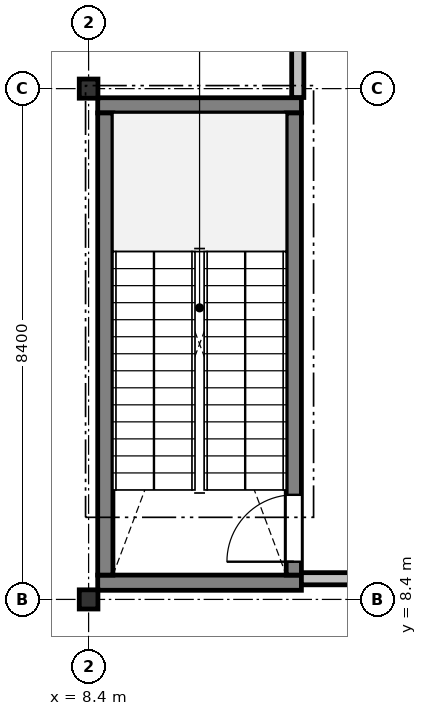
"""IFC4 building model, lengths in metres.
Left out: names, types, materials, properties, quantities, classifications, styles, units other than length and angle.
Written with IfcOpenShell. Run it as: python <this file> out.ifc"""

import sys

from ifc_helpers import new_model, si_unit, direction, frame, frame_2d, origin, origin_2d, place, context, subcontext, project, spatial, rectangle, i_section, extrude, element, fill, save


model = new_model("IFC4")
c1 = context("Model", 3, precision=1e-05, world=origin(), true_north=direction((0.0, 1.0)))
c2 = subcontext(c1, "Body", "Model", "MODEL_VIEW")
j1 = project(units=[si_unit("LENGTHUNIT", "METRE"), si_unit("PLANEANGLEUNIT", "RADIAN")], contexts=[c1])
p1 = place(None, origin())
s1 = spatial("IfcSite", under=j1, at=p1, CompositionType="ELEMENT")
p2 = place(p1, origin())
s2 = spatial("IfcBuilding", under=s1, at=p2, CompositionType="ELEMENT")
p3 = place(p2, frame((0.0, 0.0, 333.0)))
s3 = spatial("IfcBuildingStorey", under=s2, at=p3, CompositionType="ELEMENT", Elevation=333.0)
for number, where, z_axis, x_axis in (
    (1, (8.4, 8.4, 0.0), (0.0, 0.0, 1.0), (1.0, 0.0, 0.0)),
    (2, (8.4, 16.8, 0.0), (0.0, 0.0, 1.0), (1.0, 0.0, 0.0)),
):
    element("IfcColumn", number, at=place(p3, frame(where, z_axis=z_axis, x_axis=x_axis)), inside=s3, PredefinedType="COLUMN", context=c2, shape_type="SweptSolid", body=[
        extrude(i_section(OverallWidth=0.307, OverallDepth=0.315, WebThickness=0.012, FlangeThickness=0.019, FilletRadius=0.017, at=origin_2d()), origin(), (0.0, 0.0, 1.0), 5.05),
    ])
for number, where, z_axis, x_axis in (
    (3, (11.9, 8.675, -0.275), (0.0, 0.0, 1.0), (-1.0, 0.0, 0.0)),
    (4, (11.9, 16.525, -0.275), (0.0, 0.0, 1.0), (-1.0, 0.0, 0.0)),
):
    element("IfcWall", number, at=place(p3, frame(where, z_axis=z_axis, x_axis=x_axis)), inside=s3, PredefinedType="SHEAR", context=c2, shape_type="SweptSolid", body=[
        extrude(rectangle(XDim=3.35, YDim=0.25, at=frame_2d((1.675, 0.0))), origin(), (0.0, 0.0, 1.0), 5.325),
    ])
p4 = place(p3, frame((11.775, 8.8, -0.275), z_axis=(0.0, 0.0, 1.0), x_axis=(0.0, 1.0, 0.0)))
e5 = element("IfcWall", 5, at=p4, inside=s3, PredefinedType="SHEAR", context=c2, shape_type="SweptSolid", body=[
    extrude(rectangle(XDim=7.6, YDim=0.25, at=frame_2d((3.8, 0.0))), origin(), (0.0, 0.0, 1.0), 5.325),
])
p5 = place(p4, frame((0.22, 0.0, 0.275)))
e6 = element("IfcOpeningElement", 6, at=p5, cuts=e5, PredefinedType="OPENING", context=c2, shape_type="SweptSolid", body=[
    extrude(rectangle(XDim=1.1, YDim=2.15, at=frame_2d((0.55, 1.075))), frame((0.0, 0.135, 0.0), z_axis=(0.0, -1.0, 0.0), x_axis=(1.0, 0.0, 0.0)), (0.0, 0.0, 1.0), 0.27),
])
p6 = place(p3, frame((8.675, 8.8, -0.275), z_axis=(0.0, 0.0, 1.0), x_axis=(0.0, 1.0, 0.0)))
e7 = element("IfcWall", 7, at=p6, inside=s3, PredefinedType="SHEAR", context=c2, shape_type="SweptSolid", body=[
    extrude(rectangle(XDim=7.6, YDim=0.25, at=frame_2d((3.8, 0.0))), origin(), (0.0, 0.0, 1.0), 5.325),
])
p7 = place(p3, frame((16.326, 8.74, 0.0), z_axis=(0.0, 0.0, 1.0), x_axis=(-1.0, 0.0, 0.0)))
e8 = element("IfcWall", 8, at=p7, inside=s3, PredefinedType="PARTITIONING", context=c2, shape_type="SweptSolid", body=[
    extrude(rectangle(XDim=4.426, YDim=0.2, at=frame_2d((2.213, 0.0))), origin(), (0.0, 0.0, 1.0), 4.794),
])
p8 = place(p3, frame((11.84, 16.654, 0.0), z_axis=(0.0, 0.0, 1.0), x_axis=(0.0, 1.0, 0.0)))
e9 = element("IfcWall", 9, at=p8, inside=s3, PredefinedType="PARTITIONING", context=c2, shape_type="SweptSolid", body=[
    extrude(rectangle(XDim=2.546, YDim=0.2, at=frame_2d((1.273, 0.0))), origin(), (0.0, 0.0, 1.0), 4.691),
])
p9 = place(p5, origin())
e10 = element("IfcDoor", 10, at=p9, inside=s3, OperationType="SINGLE_SWING_LEFT", PredefinedType="DOOR", context=c2, shape_type="SweptSolid", body=[
    extrude(rectangle(XDim=1.1, YDim=2.15, at=frame_2d((0.55, 1.075))), frame((0.0, 0.025, 0.0), z_axis=(0.0, -1.0, 0.0), x_axis=(1.0, 0.0, 0.0)), (0.0, 0.0, 1.0), 0.05),
])
fill(e6, e10)
save(model, sys.argv[1])
